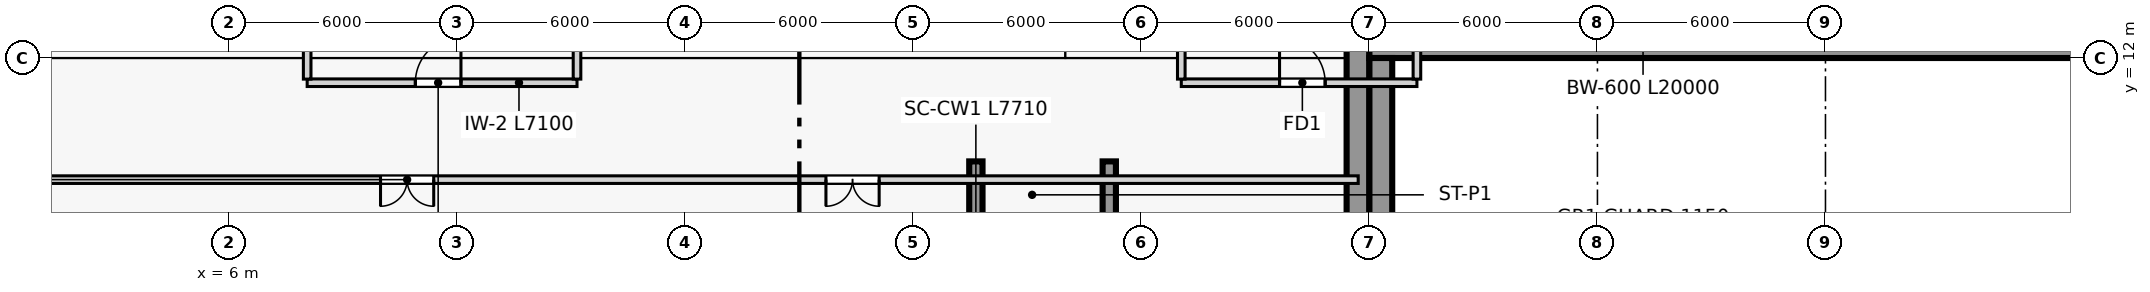
"""IFC4 building model, lengths in metres.
Left out: names, types, materials, properties, quantities, classifications, styles, units other than length and angle.
Written with IfcOpenShell. Run it as: python <this file> out.ifc"""

import sys

from ifc_helpers import new_model, si_unit, direction, frame, frame_2d, origin, place, context, subcontext, project, spatial, rectangle, extrude, source, transform, mapped, element, fill, save


model = new_model("IFC4")
c1 = context("Model", 3, precision=1e-05, world=origin(), true_north=direction((0.0, 1.0)))
c2 = subcontext(c1, "Body", "Model", "MODEL_VIEW")
j1 = project(units=[si_unit("LENGTHUNIT", "METRE"), si_unit("PLANEANGLEUNIT", "RADIAN")], contexts=[c1])
p1 = place(None, origin())
s1 = spatial("IfcSite", under=j1, at=p1, CompositionType="ELEMENT")
p2 = place(p1, origin())
s2 = spatial("IfcBuilding", under=s1, at=p2, CompositionType="ELEMENT")
p3 = place(p2, frame((0.0, 0.0, -4.5)))
s3 = spatial("IfcBuildingStorey", under=s2, at=p3, CompositionType="ELEMENT", Elevation=-4.5)
p4 = place(p3, frame((35.7, -5.4, 0.0), z_axis=(0.0, 0.0, 1.0), x_axis=(0.0, 1.0, 0.0)))
e1 = element("IfcWall", 1, at=p4, inside=s3, PredefinedType="SOLIDWALL", context=c2, shape_type="SweptSolid", body=[
    extrude(rectangle(XDim=17.7, YDim=0.6, at=frame_2d((8.85, 0.0))), origin(), (0.0, 0.0, 1.0), 4.16),
])
p5 = place(p3, frame((36.0, 12.3, 0.0), z_axis=(0.0, 0.0, 1.0), x_axis=(1.0, 0.0, 0.0)))
e2 = element("IfcWall", 2, at=p5, inside=s3, PredefinedType="SOLIDWALL", context=c2, shape_type="SweptSolid", body=[
    extrude(rectangle(XDim=20.0, YDim=0.6, at=frame_2d((10.0, 0.0))), origin(), (0.0, 0.0, 1.0), 4.16),
])
p6 = place(p3, frame((36.3, -9.7, 0.0), z_axis=(0.0, 0.0, 1.0), x_axis=(0.0, 1.0, 0.0)))
e3 = element("IfcWall", 3, at=p6, inside=s3, PredefinedType="SOLIDWALL", context=c2, shape_type="SweptSolid", body=[
    extrude(rectangle(XDim=21.7, YDim=0.6, at=frame_2d((10.85, 0.0))), origin(), (0.0, 0.0, 1.0), 4.26),
])
for number, where, z_axis, x_axis in (
    (4, (25.645, 1.57, 0.0), (0.0, 0.0, 1.0), (0.0, 1.0, 0.0)),
    (5, (29.155, 1.57, 0.0), (0.0, 0.0, 1.0), (0.0, 1.0, 0.0)),
):
    element("IfcWall", number, at=place(p3, frame(where, z_axis=z_axis, x_axis=x_axis)), inside=s3, PredefinedType="SHEAR", context=c2, shape_type="SweptSolid", body=[
        extrude(rectangle(XDim=7.71, YDim=0.35, at=frame_2d((3.855, 0.0))), origin(), (0.0, 0.0, 1.0), 4.5),
    ])
p7 = place(p3, frame((8.05, 11.35, 0.0), z_axis=(0.0, 0.0, 1.0), x_axis=(1.0, 0.0, 0.0)))
e6 = element("IfcWall", 6, at=p7, inside=s3, PredefinedType="PARTITIONING", context=c2, shape_type="SweptSolid", body=[
    extrude(rectangle(XDim=7.1, YDim=0.2, at=frame_2d((3.55, 0.0))), origin(), (0.0, 0.0, 1.0), 4.16),
])
p8 = place(p7, frame((2.846, 0.0, 0.0)))
e7 = element("IfcOpeningElement", 7, at=p8, cuts=e6, PredefinedType="OPENING", context=c2, shape_type="SweptSolid", body=[
    extrude(rectangle(XDim=1.2, YDim=2.2, at=frame_2d((0.6, 1.1))), frame((0.0, 0.11, 0.0), z_axis=(0.0, -1.0, 0.0), x_axis=(1.0, 0.0, 0.0)), (0.0, 0.0, 1.0), 0.22),
])
for number, where, z_axis, x_axis in (
    (8, (8.05, 11.445, 0.0), (0.0, 0.0, 1.0), (0.0, 1.0, 0.0)),
    (9, (15.15, 11.445, 0.0), (0.0, 0.0, 1.0), (0.0, 1.0, 0.0)),
):
    element("IfcWall", number, at=place(p3, frame(where, z_axis=z_axis, x_axis=x_axis)), inside=s3, PredefinedType="PARTITIONING", context=c2, shape_type="SweptSolid", body=[
        extrude(rectangle(XDim=2.985, YDim=0.2, at=frame_2d((1.492, 0.0))), origin(), (0.0, 0.0, 1.0), 4.16),
    ])
p9 = place(p3, frame((31.05, 11.35, 0.0), z_axis=(0.0, 0.0, 1.0), x_axis=(1.0, 0.0, 0.0)))
e10 = element("IfcWall", 10, at=p9, inside=s3, PredefinedType="PARTITIONING", context=c2, shape_type="SweptSolid", body=[
    extrude(rectangle(XDim=6.2, YDim=0.2, at=frame_2d((3.1, 0.0))), origin(), (0.0, 0.0, 1.0), 4.16),
])
p10 = place(p9, frame((2.586, 0.0, 0.0)))
e11 = element("IfcOpeningElement", 11, at=p10, cuts=e10, PredefinedType="OPENING", context=c2, shape_type="SweptSolid", body=[
    extrude(rectangle(XDim=1.2, YDim=2.2, at=frame_2d((0.6, 1.1))), frame((0.0, 0.11, 0.0), z_axis=(0.0, -1.0, 0.0), x_axis=(1.0, 0.0, 0.0)), (0.0, 0.0, 1.0), 0.22),
])
for number, where, z_axis, x_axis in (
    (12, (31.05, 11.445, 0.0), (0.0, 0.0, 1.0), (0.0, 1.0, 0.0)),
    (13, (37.25, 11.445, 0.0), (0.0, 0.0, 1.0), (0.0, 1.0, 0.0)),
):
    element("IfcWall", number, at=place(p3, frame(where, z_axis=z_axis, x_axis=x_axis)), inside=s3, PredefinedType="PARTITIONING", context=c2, shape_type="SweptSolid", body=[
        extrude(rectangle(XDim=2.985, YDim=0.2, at=frame_2d((1.492, 0.0))), origin(), (0.0, 0.0, 1.0), 4.16),
    ])
p11 = place(p3, frame((0.295, 8.8, 0.0), z_axis=(0.0, 0.0, 1.0), x_axis=(1.0, 0.0, 0.0)))
e14 = element("IfcWall", 14, at=p11, inside=s3, PredefinedType="PARTITIONING", context=c2, shape_type="SweptSolid", body=[
    extrude(rectangle(XDim=35.41, YDim=0.2, at=frame_2d((17.705, 0.0))), origin(), (0.0, 0.0, 1.0), 4.16),
])
p12 = place(p11, frame((9.685, 0.0, 0.0)))
e15 = element("IfcOpeningElement", 15, at=p12, cuts=e14, PredefinedType="OPENING", context=c2, shape_type="SweptSolid", body=[
    extrude(rectangle(XDim=1.4, YDim=2.2, at=frame_2d((0.7, 1.1))), frame((0.0, 0.11, 0.0), z_axis=(0.0, -1.0, 0.0), x_axis=(1.0, 0.0, 0.0)), (0.0, 0.0, 1.0), 0.22),
])
p13 = place(p11, frame((21.405, 0.0, 0.0)))
e16 = element("IfcOpeningElement", 16, at=p13, cuts=e14, PredefinedType="OPENING", context=c2, shape_type="SweptSolid", body=[
    extrude(rectangle(XDim=1.4, YDim=2.2, at=frame_2d((0.7, 1.1))), frame((0.0, 0.11, 0.0), z_axis=(0.0, -1.0, 0.0), x_axis=(1.0, 0.0, 0.0)), (0.0, 0.0, 1.0), 0.22),
])
m1 = source(origin(), c2, "Body", "SweptSolid", [
    extrude(rectangle(XDim=1.2, YDim=2.2, at=frame_2d((0.6, 1.1))), frame((0.0, 0.025, 0.0), z_axis=(0.0, -1.0, 0.0), x_axis=(1.0, 0.0, 0.0)), (0.0, 0.0, 1.0), 0.05),
])
p14 = place(p8, origin())
e17 = element("IfcDoor", 17, at=p14, inside=s3, OperationType="SINGLE_SWING_RIGHT", PredefinedType="DOOR", context=c2, shape_type="MappedRepresentation", body=[
    mapped(m1, transform((0.0, 0.0, 0.0), scale=1.0)),
])
fill(e7, e17)
p15 = place(p10, origin())
e18 = element("IfcDoor", 18, at=p15, inside=s3, OperationType="SINGLE_SWING_LEFT", PredefinedType="DOOR", context=c2, shape_type="MappedRepresentation", body=[
    mapped(m1, transform((0.0, 0.0, 0.0), scale=1.0)),
])
fill(e11, e18)
m2 = source(origin(), c2, "Body", "SweptSolid", [
    extrude(rectangle(XDim=1.4, YDim=2.2, at=frame_2d((0.7, 1.1))), frame((0.0, 0.025, 0.0), z_axis=(0.0, -1.0, 0.0), x_axis=(1.0, 0.0, 0.0)), (0.0, 0.0, 1.0), 0.05),
])
p16 = place(p12, frame((1.4, 0.0, 0.0), z_axis=(0.0, 0.0, 1.0), x_axis=(-1.0, 0.0, 0.0)))
e19 = element("IfcDoor", 19, at=p16, inside=s3, OperationType="DOUBLE_DOOR_SINGLE_SWING", PredefinedType="DOOR", context=c2, shape_type="MappedRepresentation", body=[
    mapped(m2, transform((0.0, 0.0, 0.0), scale=1.0)),
])
fill(e15, e19)
p17 = place(p13, frame((1.4, 0.0, 0.0), z_axis=(0.0, 0.0, 1.0), x_axis=(-1.0, 0.0, 0.0)))
e20 = element("IfcDoor", 20, at=p17, inside=s3, OperationType="DOUBLE_DOOR_SINGLE_SWING", PredefinedType="DOOR", context=c2, shape_type="MappedRepresentation", body=[
    mapped(m2, transform((0.0, 0.0, 0.0), scale=1.0)),
])
fill(e16, e20)
save(model, sys.argv[1])
